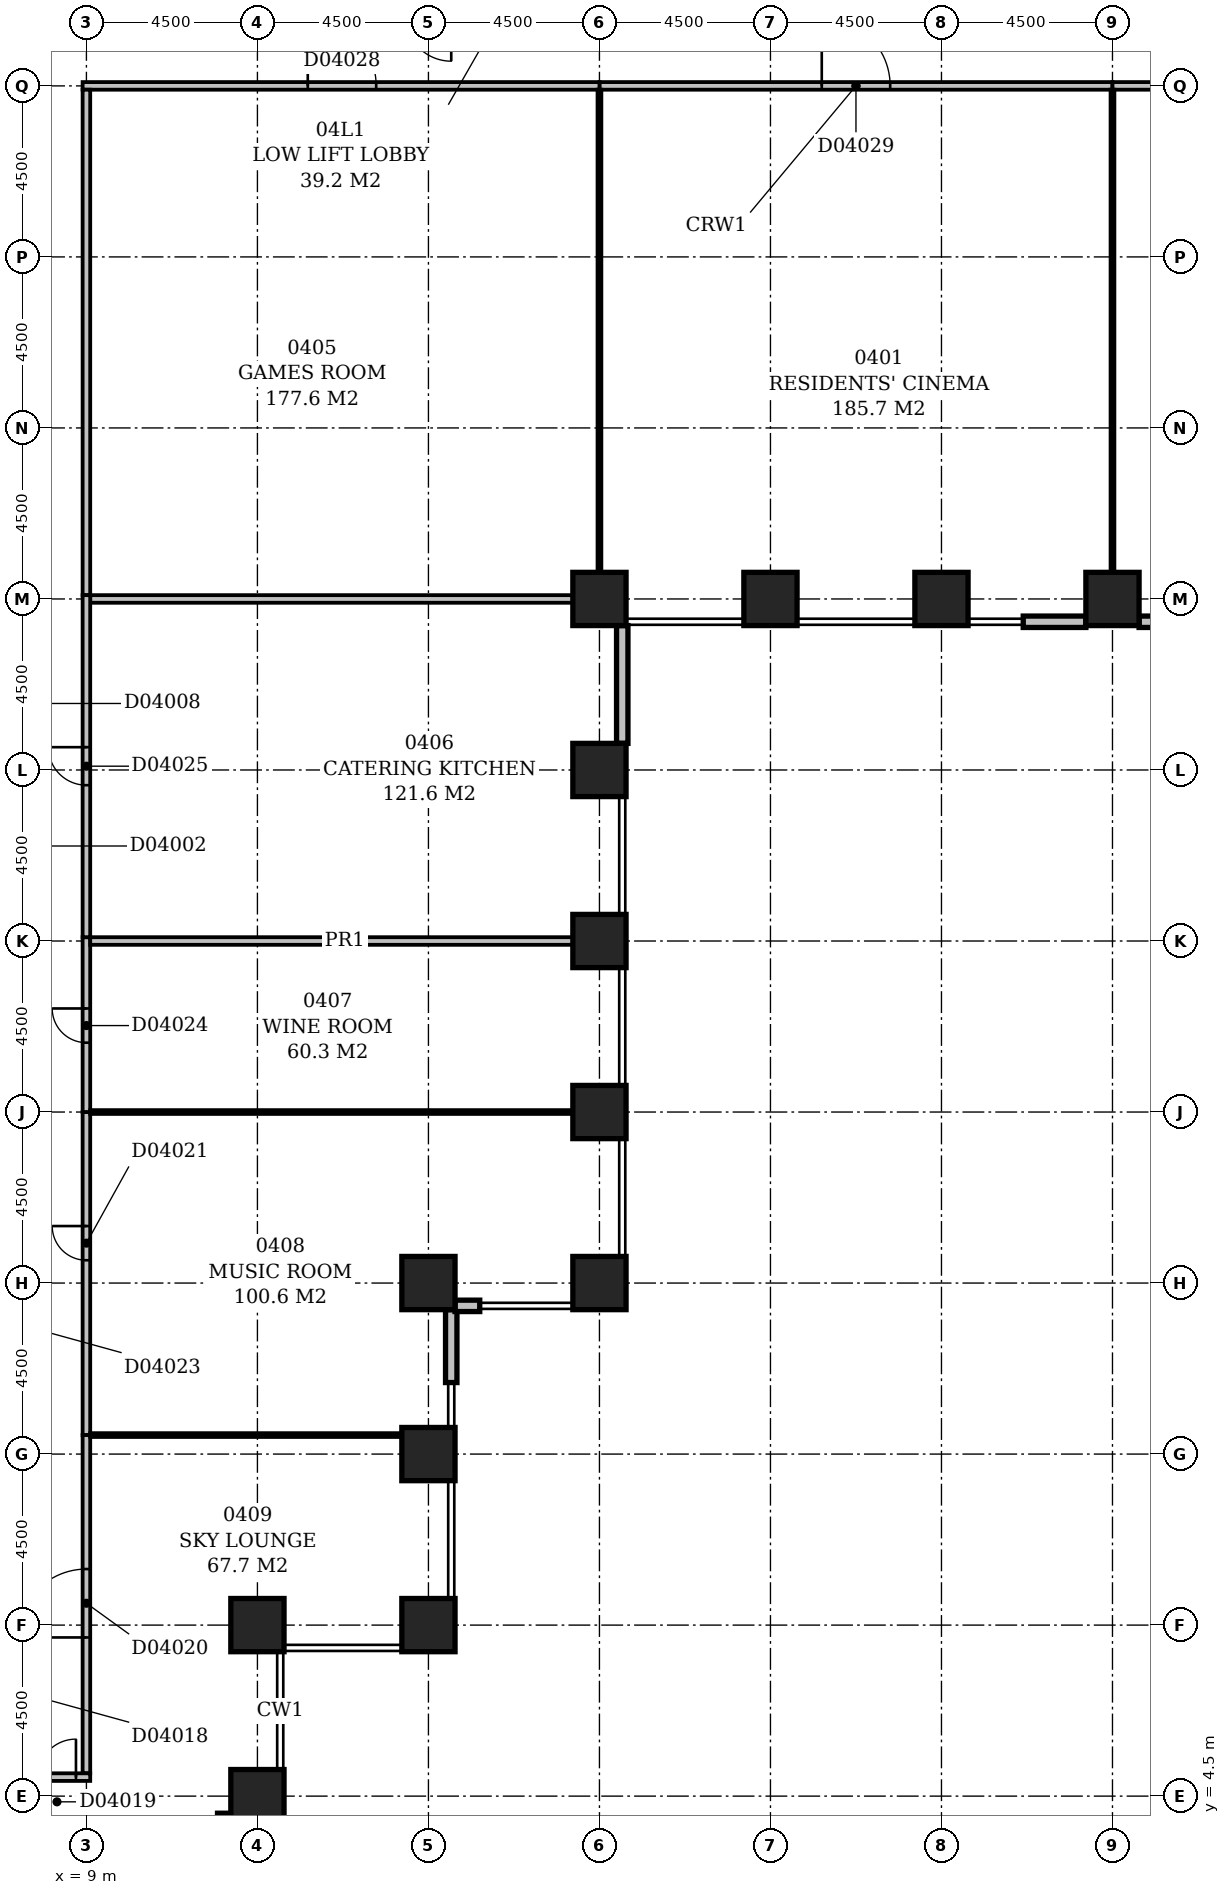
"""IFC4 building model, lengths in metres.
Left out: names, types, materials, properties, quantities, classifications, styles, units other than length and angle.
Written with IfcOpenShell. Run it as: python <this file> out.ifc"""

import sys

from ifc_helpers import new_model, si_unit, direction, frame, frame_2d, origin, origin_2d, place, context, subcontext, project, spatial, rectangle, extrude, element, fill, save


model = new_model("IFC4")
c1 = context("Model", 3, precision=1e-05, world=origin(), true_north=direction((0.0, 1.0)))
c2 = subcontext(c1, "Body", "Model", "MODEL_VIEW")
j1 = project(units=[si_unit("LENGTHUNIT", "METRE"), si_unit("PLANEANGLEUNIT", "RADIAN")], contexts=[c1])
p1 = place(None, origin())
s1 = spatial("IfcSite", under=j1, at=p1, CompositionType="ELEMENT")
p2 = place(p1, origin())
s2 = spatial("IfcBuilding", under=s1, at=p2, CompositionType="ELEMENT")
p3 = place(p2, frame((0.0, 0.0, 24.0)))
s3 = spatial("IfcBuildingStorey", under=s2, at=p3, CompositionType="ELEMENT", Elevation=24.0)
for number, where, z_axis, x_axis in (
    (1, (13.5, 4.5, -0.45), (0.0, 0.0, 1.0), (1.0, 0.0, 0.0)),
    (2, (13.5, 9.0, -0.45), (0.0, 0.0, 1.0), (1.0, 0.0, 0.0)),
    (3, (18.0, 9.0, -0.45), (0.0, 0.0, 1.0), (1.0, 0.0, 0.0)),
    (4, (18.0, 13.5, -0.45), (0.0, 0.0, 1.0), (1.0, 0.0, 0.0)),
    (5, (18.0, 18.0, -0.45), (0.0, 0.0, 1.0), (1.0, 0.0, 0.0)),
    (6, (22.5, 18.0, -0.45), (0.0, 0.0, 1.0), (1.0, 0.0, 0.0)),
    (7, (22.5, 22.5, -0.45), (0.0, 0.0, 1.0), (1.0, 0.0, 0.0)),
    (8, (22.5, 27.0, -0.45), (0.0, 0.0, 1.0), (1.0, 0.0, 0.0)),
    (9, (22.5, 31.5, -0.45), (0.0, 0.0, 1.0), (1.0, 0.0, 0.0)),
    (10, (22.5, 36.0, -0.45), (0.0, 0.0, 1.0), (1.0, 0.0, 0.0)),
    (11, (27.0, 36.0, -0.45), (0.0, 0.0, 1.0), (1.0, 0.0, 0.0)),
    (12, (31.5, 36.0, -0.45), (0.0, 0.0, 1.0), (1.0, 0.0, 0.0)),
    (13, (36.0, 36.0, -0.45), (0.0, 0.0, 1.0), (1.0, 0.0, 0.0)),
):
    element("IfcColumn", number, at=place(p3, frame(where, z_axis=z_axis, x_axis=x_axis)), inside=s3, PredefinedType="COLUMN", context=c2, shape_type="SweptSolid", body=[
        extrude(rectangle(XDim=1.4, YDim=1.4, at=origin_2d()), origin(), (0.0, 0.0, 1.0), 5.15),
    ])
p4 = place(p3, frame((12.45, 3.9, 0.0), z_axis=(0.0, 0.0, 1.0), x_axis=(1.0, 0.0, 0.0)))
e14 = element("IfcWall", 14, at=p4, inside=s3, PredefinedType="STANDARD", context=c2, shape_type="SweptSolid", body=[
    extrude(rectangle(XDim=0.35, YDim=0.3, at=frame_2d((0.175, 0.0))), origin(), (0.0, 0.0, 1.0), 4.1),
])
p5 = place(p3, frame((18.6, 15.382, 0.0), z_axis=(0.0, 0.0, 1.0), x_axis=(0.0, 1.0, 0.0)))
e15 = element("IfcWall", 15, at=p5, inside=s3, PredefinedType="STANDARD", context=c2, shape_type="SweptSolid", body=[
    extrude(rectangle(XDim=1.918, YDim=0.3, at=frame_2d((0.959, 0.0))), origin(), (0.0, 0.0, 1.0), 4.1),
])
p6 = place(p3, frame((18.7, 17.4, 0.0), z_axis=(0.0, 0.0, 1.0), x_axis=(1.0, 0.0, 0.0)))
e16 = element("IfcWall", 16, at=p6, inside=s3, PredefinedType="STANDARD", context=c2, shape_type="SweptSolid", body=[
    extrude(rectangle(XDim=0.65, YDim=0.3, at=frame_2d((0.325, 0.0))), origin(), (0.0, 0.0, 1.0), 4.1),
])
p7 = place(p3, frame((23.1, 32.2, 0.0), z_axis=(0.0, 0.0, 1.0), x_axis=(0.0, 1.0, 0.0)))
e17 = element("IfcWall", 17, at=p7, inside=s3, PredefinedType="STANDARD", context=c2, shape_type="SweptSolid", body=[
    extrude(rectangle(XDim=3.1, YDim=0.3, at=frame_2d((1.55, 0.0))), origin(), (0.0, 0.0, 1.0), 4.1),
])
p8 = place(p3, frame((33.652, 35.4, 0.0), z_axis=(0.0, 0.0, 1.0), x_axis=(1.0, 0.0, 0.0)))
e18 = element("IfcWall", 18, at=p8, inside=s3, PredefinedType="STANDARD", context=c2, shape_type="SweptSolid", body=[
    extrude(rectangle(XDim=1.648, YDim=0.3, at=frame_2d((0.824, 0.0))), origin(), (0.0, 0.0, 1.0), 4.1),
])
p9 = place(p3, frame((36.7, 35.4, 0.0), z_axis=(0.0, 0.0, 1.0), x_axis=(1.0, 0.0, 0.0)))
e19 = element("IfcWall", 19, at=p9, inside=s3, PredefinedType="STANDARD", context=c2, shape_type="SweptSolid", body=[
    extrude(rectangle(XDim=1.809, YDim=0.3, at=frame_2d((0.905, 0.0))), origin(), (0.0, 0.0, 1.0), 4.1),
])
p10 = place(p3, frame((7.35, 5.0, 0.0), z_axis=(0.0, 0.0, 1.0), x_axis=(1.0, 0.0, 0.0)))
e20 = element("IfcWall", 20, at=p10, inside=s3, PredefinedType="PARTITIONING", context=c2, shape_type="SweptSolid", body=[
    extrude(rectangle(XDim=1.75, YDim=0.2, at=frame_2d((0.875, 0.0))), origin(), (0.0, 0.0, 1.0), 4.7),
])
p11 = place(p10, frame((0.375, 0.0, 0.0)))
e21 = element("IfcOpeningElement", 21, at=p11, cuts=e20, PredefinedType="OPENING", context=c2, shape_type="SweptSolid", body=[
    extrude(rectangle(XDim=1.0, YDim=2.1, at=frame_2d((0.5, 1.05))), frame((0.0, 0.112, 0.0), z_axis=(0.0, -1.0, 0.0), x_axis=(1.0, 0.0, 0.0)), (0.0, 0.0, 1.0), 0.224),
])
p12 = place(p3, frame((9.0, 5.1, 0.0), z_axis=(0.0, 0.0, 1.0), x_axis=(0.0, 1.0, 0.0)))
e22 = element("IfcWall", 22, at=p12, inside=s3, PredefinedType="PARTITIONING", context=c2, shape_type="SweptSolid", body=[
    extrude(rectangle(XDim=8.9, YDim=0.2, at=frame_2d((4.45, 0.0))), origin(), (0.0, 0.0, 1.0), 4.7),
])
p13 = place(p12, frame((3.575, 0.0, 0.0)))
e23 = element("IfcOpeningElement", 23, at=p13, cuts=e22, PredefinedType="OPENING", context=c2, shape_type="SweptSolid", body=[
    extrude(rectangle(XDim=1.8, YDim=2.4, at=frame_2d((0.9, 1.2))), frame((0.0, 0.112, 0.0), z_axis=(0.0, -1.0, 0.0), x_axis=(1.0, 0.0, 0.0)), (0.0, 0.0, 1.0), 0.224),
])
p14 = place(p3, frame((9.0, 14.0, 0.0), z_axis=(0.0, 0.0, 1.0), x_axis=(0.0, 1.0, 0.0)))
e24 = element("IfcWall", 24, at=p14, inside=s3, PredefinedType="PARTITIONING", context=c2, shape_type="SweptSolid", body=[
    extrude(rectangle(XDim=8.5, YDim=0.2, at=frame_2d((4.25, 0.0))), origin(), (0.0, 0.0, 1.0), 4.7),
])
p15 = place(p14, frame((4.6, 0.0, 0.0)))
e25 = element("IfcOpeningElement", 25, at=p15, cuts=e24, PredefinedType="OPENING", context=c2, shape_type="SweptSolid", body=[
    extrude(rectangle(XDim=0.9, YDim=2.1, at=frame_2d((0.45, 1.05))), frame((0.0, 0.112, 0.0), z_axis=(0.0, -1.0, 0.0), x_axis=(1.0, 0.0, 0.0)), (0.0, 0.0, 1.0), 0.224),
])
p16 = place(p3, frame((18.0, 14.0, 0.0), z_axis=(0.0, 0.0, 1.0), x_axis=(-1.0, 0.0, 0.0)))
e26 = element("IfcWall", 26, at=p16, inside=s3, PredefinedType="PARTITIONING", context=c2, shape_type="SweptSolid", body=[
    extrude(rectangle(XDim=8.9, YDim=0.1, at=frame_2d((4.45, 0.0))), origin(), (0.0, 0.0, 1.0), 4.7),
])
p17 = place(p3, frame((9.0, 22.5, 0.0), z_axis=(0.0, 0.0, 1.0), x_axis=(0.0, 1.0, 0.0)))
e27 = element("IfcWall", 27, at=p17, inside=s3, PredefinedType="PARTITIONING", context=c2, shape_type="SweptSolid", body=[
    extrude(rectangle(XDim=4.6, YDim=0.2, at=frame_2d((2.3, 0.0))), origin(), (0.0, 0.0, 1.0), 4.7),
])
p18 = place(p17, frame((1.825, 0.0, 0.0)))
e28 = element("IfcOpeningElement", 28, at=p18, cuts=e27, PredefinedType="OPENING", context=c2, shape_type="SweptSolid", body=[
    extrude(rectangle(XDim=0.9, YDim=2.1, at=frame_2d((0.45, 1.05))), frame((0.0, 0.112, 0.0), z_axis=(0.0, -1.0, 0.0), x_axis=(1.0, 0.0, 0.0)), (0.0, 0.0, 1.0), 0.224),
])
p19 = place(p3, frame((22.5, 22.5, 0.0), z_axis=(0.0, 0.0, 1.0), x_axis=(-1.0, 0.0, 0.0)))
e29 = element("IfcWall", 29, at=p19, inside=s3, PredefinedType="PARTITIONING", context=c2, shape_type="SweptSolid", body=[
    extrude(rectangle(XDim=13.4, YDim=0.1, at=frame_2d((6.7, 0.0))), origin(), (0.0, 0.0, 1.0), 4.7),
])
p20 = place(p3, frame((9.0, 27.1, 0.0), z_axis=(0.0, 0.0, 1.0), x_axis=(0.0, 1.0, 0.0)))
e30 = element("IfcWall", 30, at=p20, inside=s3, PredefinedType="PARTITIONING", context=c2, shape_type="SweptSolid", body=[
    extrude(rectangle(XDim=9.0, YDim=0.2, at=frame_2d((4.5, 0.0))), origin(), (0.0, 0.0, 1.0), 4.7),
])
p21 = place(p20, frame((4.0, 0.0, 0.0)))
e31 = element("IfcOpeningElement", 31, at=p21, cuts=e30, PredefinedType="OPENING", context=c2, shape_type="SweptSolid", body=[
    extrude(rectangle(XDim=1.0, YDim=2.1, at=frame_2d((0.5, 1.05))), frame((0.0, 0.112, 0.0), z_axis=(0.0, -1.0, 0.0), x_axis=(1.0, 0.0, 0.0)), (0.0, 0.0, 1.0), 0.224),
])
p22 = place(p3, frame((22.5, 27.0, 0.0), z_axis=(0.0, 0.0, 1.0), x_axis=(-1.0, 0.0, 0.0)))
e32 = element("IfcWall", 32, at=p22, inside=s3, PredefinedType="PARTITIONING", context=c2, shape_type="SweptSolid", body=[
    extrude(rectangle(XDim=13.4, YDim=0.2, at=frame_2d((6.7, 0.0))), origin(), (0.0, 0.0, 1.0), 4.1),
])
p23 = place(p3, frame((22.5, 35.4, 0.0), z_axis=(0.0, 0.0, 1.0), x_axis=(0.0, 1.0, 0.0)))
e33 = element("IfcWall", 33, at=p23, inside=s3, PredefinedType="PARTITIONING", context=c2, shape_type="SweptSolid", body=[
    extrude(rectangle(XDim=0.5, YDim=0.2, at=frame_2d((0.25, 0.0))), origin(), (0.0, 0.0, 1.0), 4.1),
])
p24 = place(p3, frame((9.0, 36.1, 0.0), z_axis=(0.0, 0.0, 1.0), x_axis=(0.0, 1.0, 0.0)))
e34 = element("IfcWall", 34, at=p24, inside=s3, PredefinedType="PARTITIONING", context=c2, shape_type="SweptSolid", body=[
    extrude(rectangle(XDim=13.3, YDim=0.2, at=frame_2d((6.65, 0.0))), origin(), (0.0, 0.0, 1.0), 4.7),
])
p25 = place(p3, frame((22.6, 36.0, 0.0), z_axis=(0.0, 0.0, 1.0), x_axis=(-1.0, 0.0, 0.0)))
e35 = element("IfcWall", 35, at=p25, inside=s3, PredefinedType="PARTITIONING", context=c2, shape_type="SweptSolid", body=[
    extrude(rectangle(XDim=13.5, YDim=0.2, at=frame_2d((6.75, 0.0))), origin(), (0.0, 0.0, 1.0), 3.8),
])
p26 = place(p3, frame((22.5, 36.1, 0.0), z_axis=(0.0, 0.0, 1.0), x_axis=(0.0, 1.0, 0.0)))
e36 = element("IfcWall", 36, at=p26, inside=s3, PredefinedType="PARTITIONING", context=c2, shape_type="SweptSolid", body=[
    extrude(rectangle(XDim=13.3, YDim=0.1, at=frame_2d((6.65, 0.0))), origin(), (0.0, 0.0, 1.0), 4.7),
])
p27 = place(p3, frame((8.9, 49.5, 0.0), z_axis=(0.0, 0.0, 1.0), x_axis=(1.0, 0.0, 0.0)))
e37 = element("IfcWall", 37, at=p27, inside=s3, PredefinedType="PARTITIONING", context=c2, shape_type="SweptSolid", body=[
    extrude(rectangle(XDim=13.6, YDim=0.2, at=frame_2d((6.8, 0.0))), origin(), (0.0, 0.0, 1.0), 4.7),
])
p28 = place(p27, frame((5.925, 0.0, 0.0)))
e38 = element("IfcOpeningElement", 38, at=p28, cuts=e37, PredefinedType="OPENING", context=c2, shape_type="SweptSolid", body=[
    extrude(rectangle(XDim=1.8, YDim=2.4, at=frame_2d((0.9, 1.2))), frame((0.0, 0.112, 0.0), z_axis=(0.0, -1.0, 0.0), x_axis=(1.0, 0.0, 0.0)), (0.0, 0.0, 1.0), 0.224),
])
p29 = place(p3, frame((22.5, 49.5, 0.0), z_axis=(0.0, 0.0, 1.0), x_axis=(1.0, 0.0, 0.0)))
e39 = element("IfcWall", 39, at=p29, inside=s3, PredefinedType="PARTITIONING", context=c2, shape_type="SweptSolid", body=[
    extrude(rectangle(XDim=13.5, YDim=0.2, at=frame_2d((6.75, 0.0))), origin(), (0.0, 0.0, 1.0), 4.7),
])
p30 = place(p29, frame((5.85, 0.0, 0.0)))
e40 = element("IfcOpeningElement", 40, at=p30, cuts=e39, PredefinedType="OPENING", context=c2, shape_type="SweptSolid", body=[
    extrude(rectangle(XDim=1.8, YDim=2.4, at=frame_2d((0.9, 1.2))), frame((0.0, 0.112, 0.0), z_axis=(0.0, -1.0, 0.0), x_axis=(1.0, 0.0, 0.0)), (0.0, 0.0, 1.0), 0.224),
])
p31 = place(p3, frame((36.0, 49.4, 0.0), z_axis=(0.0, 0.0, 1.0), x_axis=(0.0, -1.0, 0.0)))
e41 = element("IfcWall", 41, at=p31, inside=s3, PredefinedType="PARTITIONING", context=c2, shape_type="SweptSolid", body=[
    extrude(rectangle(XDim=13.4, YDim=0.1, at=frame_2d((6.7, 0.0))), origin(), (0.0, 0.0, 1.0), 3.8),
])
p32 = place(p3, frame((36.0, 49.5, 0.0), z_axis=(0.0, 0.0, 1.0), x_axis=(1.0, 0.0, 0.0)))
e42 = element("IfcWall", 42, at=p32, inside=s3, PredefinedType="PARTITIONING", context=c2, shape_type="SweptSolid", body=[
    extrude(rectangle(XDim=18.0, YDim=0.2, at=frame_2d((9.0, 0.0))), origin(), (0.0, 0.0, 1.0), 4.7),
])
p33 = place(p32, frame((9.65, 0.0, 0.0)))
e43 = element("IfcOpeningElement", 43, at=p33, cuts=e42, PredefinedType="OPENING", context=c2, shape_type="SweptSolid", body=[
    extrude(rectangle(XDim=1.8, YDim=2.4, at=frame_2d((0.9, 1.2))), frame((0.0, 0.112, 0.0), z_axis=(0.0, -1.0, 0.0), x_axis=(1.0, 0.0, 0.0)), (0.0, 0.0, 1.0), 0.224),
])
p34 = place(p11, frame((1.0, 0.0, 0.0), z_axis=(0.0, 0.0, 1.0), x_axis=(-1.0, 0.0, 0.0)))
e44 = element("IfcDoor", 44, at=p34, inside=s3, OperationType="SINGLE_SWING_LEFT", PredefinedType="DOOR", context=c2, shape_type="SweptSolid", body=[
    extrude(rectangle(XDim=1.0, YDim=2.1, at=frame_2d((0.5, 1.05))), frame((0.0, 0.025, 0.0), z_axis=(0.0, -1.0, 0.0), x_axis=(1.0, 0.0, 0.0)), (0.0, 0.0, 1.0), 0.05),
])
fill(e21, e44)
p35 = place(p13, origin())
e45 = element("IfcDoor", 45, at=p35, inside=s3, OperationType="DOUBLE_DOOR_SINGLE_SWING", PredefinedType="DOOR", context=c2, shape_type="SweptSolid", body=[
    extrude(rectangle(XDim=1.8, YDim=2.4, at=frame_2d((0.9, 1.2))), frame((0.0, 0.025, 0.0), z_axis=(0.0, -1.0, 0.0), x_axis=(1.0, 0.0, 0.0)), (0.0, 0.0, 1.0), 0.05),
])
fill(e23, e45)
p36 = place(p15, frame((0.9, 0.0, 0.0), z_axis=(0.0, 0.0, 1.0), x_axis=(-1.0, 0.0, 0.0)))
e46 = element("IfcDoor", 46, at=p36, inside=s3, OperationType="SINGLE_SWING_LEFT", PredefinedType="DOOR", context=c2, shape_type="SweptSolid", body=[
    extrude(rectangle(XDim=0.9, YDim=2.1, at=frame_2d((0.45, 1.05))), frame((0.0, 0.025, 0.0), z_axis=(0.0, -1.0, 0.0), x_axis=(1.0, 0.0, 0.0)), (0.0, 0.0, 1.0), 0.05),
])
fill(e25, e46)
p37 = place(p18, frame((0.9, 0.0, 0.0), z_axis=(0.0, 0.0, 1.0), x_axis=(-1.0, 0.0, 0.0)))
e47 = element("IfcDoor", 47, at=p37, inside=s3, OperationType="SINGLE_SWING_LEFT", PredefinedType="DOOR", context=c2, shape_type="SweptSolid", body=[
    extrude(rectangle(XDim=0.9, YDim=2.1, at=frame_2d((0.45, 1.05))), frame((0.0, 0.025, 0.0), z_axis=(0.0, -1.0, 0.0), x_axis=(1.0, 0.0, 0.0)), (0.0, 0.0, 1.0), 0.05),
])
fill(e28, e47)
p38 = place(p21, frame((1.0, 0.0, 0.0), z_axis=(0.0, 0.0, 1.0), x_axis=(-1.0, 0.0, 0.0)))
e48 = element("IfcDoor", 48, at=p38, inside=s3, OperationType="SINGLE_SWING_LEFT", PredefinedType="DOOR", context=c2, shape_type="SweptSolid", body=[
    extrude(rectangle(XDim=1.0, YDim=2.1, at=frame_2d((0.5, 1.05))), frame((0.0, 0.025, 0.0), z_axis=(0.0, -1.0, 0.0), x_axis=(1.0, 0.0, 0.0)), (0.0, 0.0, 1.0), 0.05),
])
fill(e31, e48)
p39 = place(p28, origin())
e49 = element("IfcDoor", 49, at=p39, inside=s3, OperationType="DOUBLE_DOOR_SINGLE_SWING", PredefinedType="DOOR", context=c2, shape_type="SweptSolid", body=[
    extrude(rectangle(XDim=1.8, YDim=2.4, at=frame_2d((0.9, 1.2))), frame((0.0, 0.025, 0.0), z_axis=(0.0, -1.0, 0.0), x_axis=(1.0, 0.0, 0.0)), (0.0, 0.0, 1.0), 0.05),
])
fill(e38, e49)
p40 = place(p30, origin())
e50 = element("IfcDoor", 50, at=p40, inside=s3, OperationType="DOUBLE_DOOR_SINGLE_SWING", PredefinedType="DOOR", context=c2, shape_type="SweptSolid", body=[
    extrude(rectangle(XDim=1.8, YDim=2.4, at=frame_2d((0.9, 1.2))), frame((0.0, 0.025, 0.0), z_axis=(0.0, -1.0, 0.0), x_axis=(1.0, 0.0, 0.0)), (0.0, 0.0, 1.0), 0.05),
])
fill(e40, e50)
save(model, sys.argv[1])
